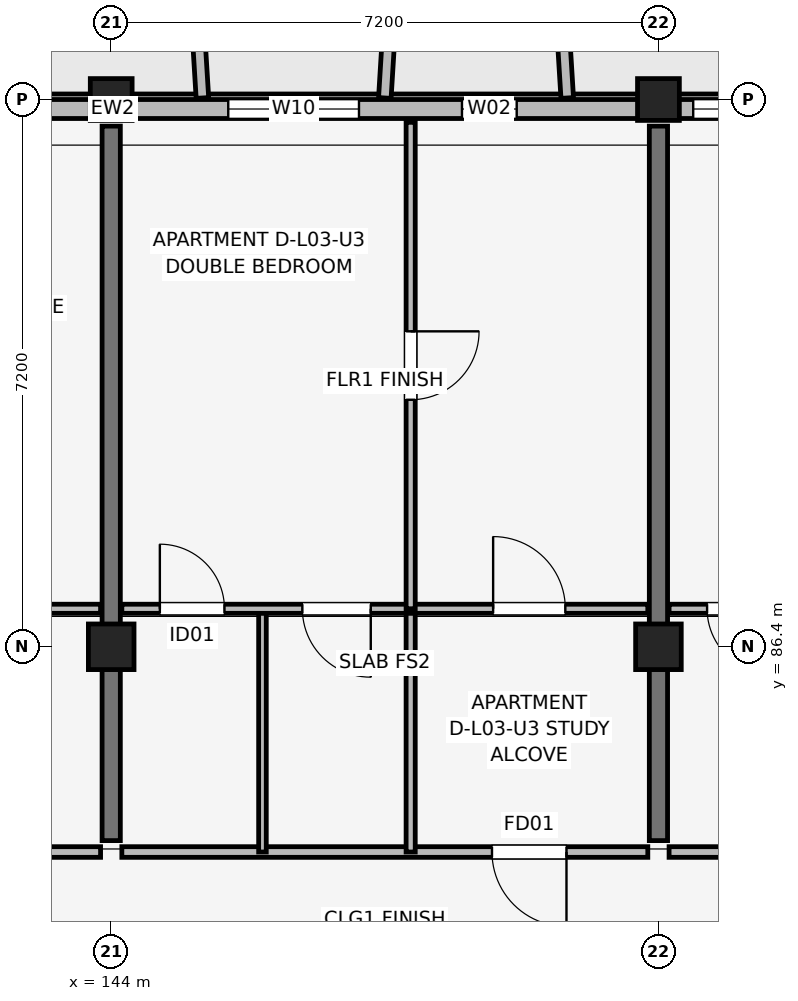
"""IFC4 building model, lengths in metres.
Left out: names, types, materials, properties, quantities, classifications, styles, units other than length and angle.
Written with IfcOpenShell. Run it as: python <this file> out.ifc"""

import sys

from ifc_helpers import new_model, si_unit, direction, frame, frame_2d, origin, origin_2d, place, context, subcontext, project, spatial, rectangle, extrude, element, fill, save


model = new_model("IFC4")
c1 = context("Model", 3, precision=1e-05, world=origin(), true_north=direction((0.0, 1.0)))
c2 = subcontext(c1, "Body", "Model", "MODEL_VIEW")
j1 = project(units=[si_unit("LENGTHUNIT", "METRE"), si_unit("PLANEANGLEUNIT", "RADIAN")], contexts=[c1])
p1 = place(None, origin())
s1 = spatial("IfcSite", under=j1, at=p1, CompositionType="ELEMENT")
p2 = place(p1, origin())
s2 = spatial("IfcBuilding", under=s1, at=p2, CompositionType="ELEMENT")
p3 = place(p2, frame((0.0, 0.0, 11.85)))
s3 = spatial("IfcBuildingStorey", under=s2, at=p3, CompositionType="ELEMENT", Elevation=11.85)
p4 = place(p3, frame((144.0, 86.4, 0.0), z_axis=(0.0, 0.0, 1.0), x_axis=(1.0, 0.0, 0.0)))
e1 = element("IfcColumn", 1, at=p4, inside=s3, PredefinedType="COLUMN", context=c2, shape_type="SweptSolid", body=[
    extrude(rectangle(XDim=0.6, YDim=0.6, at=origin_2d()), origin(), (0.0, 0.0, 1.0), 3.15),
])
p5 = place(p3, frame((144.0, 93.6, 0.0), z_axis=(0.0, 0.0, 1.0), x_axis=(1.0, 0.0, 0.0)))
e2 = element("IfcColumn", 2, at=p5, inside=s3, PredefinedType="COLUMN", context=c2, shape_type="SweptSolid", body=[
    extrude(rectangle(XDim=0.55, YDim=0.55, at=origin_2d()), origin(), (0.0, 0.0, 1.0), 3.15),
])
p6 = place(p3, frame((151.2, 86.4, 0.0), z_axis=(0.0, 0.0, 1.0), x_axis=(1.0, 0.0, 0.0)))
e3 = element("IfcColumn", 3, at=p6, inside=s3, PredefinedType="COLUMN", context=c2, shape_type="SweptSolid", body=[
    extrude(rectangle(XDim=0.6, YDim=0.6, at=origin_2d()), origin(), (0.0, 0.0, 1.0), 3.15),
])
p7 = place(p3, frame((151.2, 93.6, 0.0), z_axis=(0.0, 0.0, 1.0), x_axis=(1.0, 0.0, 0.0)))
e4 = element("IfcColumn", 4, at=p7, inside=s3, PredefinedType="COLUMN", context=c2, shape_type="SweptSolid", body=[
    extrude(rectangle(XDim=0.55, YDim=0.55, at=origin_2d()), origin(), (0.0, 0.0, 1.0), 3.15),
])
for number, where, z_axis, x_axis in (
    (5, (144.0, 83.85, 0.0), (0.0, 0.0, 1.0), (0.0, 1.0, 0.0)),
    (6, (151.2, 83.85, 0.0), (0.0, 0.0, 1.0), (0.0, 1.0, 0.0)),
):
    element("IfcWall", number, at=place(p3, frame(where, z_axis=z_axis, x_axis=x_axis)), inside=s3, PredefinedType="SHEAR", context=c2, shape_type="SweptSolid", body=[
        extrude(rectangle(XDim=9.4, YDim=0.24, at=frame_2d((4.7, 0.0))), origin(), (0.0, 0.0, 1.0), 3.15),
    ])
p8 = place(p3, frame((162.8, 93.475, 0.0), z_axis=(0.0, 0.0, 1.0), x_axis=(-1.0, 0.0, 0.0)))
e7 = element("IfcWall", 7, at=p8, inside=s3, PredefinedType="SOLIDWALL", context=c2, shape_type="SweptSolid", body=[
    extrude(rectangle(XDim=30.4, YDim=0.25, at=frame_2d((15.2, 0.0))), origin(), (0.0, 0.0, 1.0), 2.43),
])
p9 = place(p8, frame((22.1, 0.0, 0.0), z_axis=(0.0, 0.0, 1.0), x_axis=(-1.0, 0.0, 0.0)))
e8 = element("IfcOpeningElement", 8, at=p9, cuts=e7, PredefinedType="OPENING", context=c2, shape_type="SweptSolid", body=[
    extrude(rectangle(XDim=1.8, YDim=2.15, at=frame_2d((0.9, 1.075))), frame((0.0, 0.135, 0.0), z_axis=(0.0, -1.0, 0.0), x_axis=(1.0, 0.0, 0.0)), (0.0, 0.0, 1.0), 0.27),
])
p10 = place(p8, frame((7.625, 0.0, 0.0), z_axis=(0.0, 0.0, 1.0), x_axis=(-1.0, 0.0, 0.0)))
e9 = element("IfcOpeningElement", 9, at=p10, cuts=e7, PredefinedType="OPENING", context=c2, shape_type="SweptSolid", body=[
    extrude(rectangle(XDim=1.65, YDim=2.15, at=frame_2d((0.825, 1.075))), frame((0.0, 0.135, 0.0), z_axis=(0.0, -1.0, 0.0), x_axis=(1.0, 0.0, 0.0)), (0.0, 0.0, 1.0), 0.27),
])
p11 = place(p8, frame((27.97, 0.0, 0.7)))
e10 = element("IfcOpeningElement", 10, at=p11, cuts=e7, PredefinedType="OPENING", context=c2, shape_type="SweptSolid", body=[
    extrude(rectangle(XDim=1.46, YDim=1.55, at=frame_2d((0.73, 0.775))), frame((0.0, 0.135, 0.0), z_axis=(0.0, -1.0, 0.0), x_axis=(1.0, 0.0, 0.0)), (0.0, 0.0, 1.0), 0.27),
])
p12 = place(p8, frame((26.458, 0.0, 0.75)))
e11 = element("IfcOpeningElement", 11, at=p12, cuts=e7, PredefinedType="OPENING", context=c2, shape_type="SweptSolid", body=[
    extrude(rectangle(XDim=0.6, YDim=1.25, at=frame_2d((0.3, 0.625))), frame((0.0, 0.135, 0.0), z_axis=(0.0, -1.0, 0.0), x_axis=(1.0, 0.0, 0.0)), (0.0, 0.0, 1.0), 0.27),
])
p13 = place(p8, frame((24.942, 0.0, 0.75)))
e12 = element("IfcOpeningElement", 12, at=p13, cuts=e7, PredefinedType="OPENING", context=c2, shape_type="SweptSolid", body=[
    extrude(rectangle(XDim=0.6, YDim=1.25, at=frame_2d((0.3, 0.625))), frame((0.0, 0.135, 0.0), z_axis=(0.0, -1.0, 0.0), x_axis=(1.0, 0.0, 0.0)), (0.0, 0.0, 1.0), 0.27),
])
p14 = place(p8, frame((15.54, 0.0, 0.7)))
e13 = element("IfcOpeningElement", 13, at=p14, cuts=e7, PredefinedType="OPENING", context=c2, shape_type="SweptSolid", body=[
    extrude(rectangle(XDim=1.72, YDim=1.6, at=frame_2d((0.86, 0.8))), frame((0.0, 0.135, 0.0), z_axis=(0.0, -1.0, 0.0), x_axis=(1.0, 0.0, 0.0)), (0.0, 0.0, 1.0), 0.27),
])
p15 = place(p8, frame((13.465, 0.0, 0.75)))
e14 = element("IfcOpeningElement", 14, at=p15, cuts=e7, PredefinedType="OPENING", context=c2, shape_type="SweptSolid", body=[
    extrude(rectangle(XDim=0.72, YDim=1.35, at=frame_2d((0.36, 0.675))), frame((0.0, 0.135, 0.0), z_axis=(0.0, -1.0, 0.0), x_axis=(1.0, 0.0, 0.0)), (0.0, 0.0, 1.0), 0.27),
])
p16 = place(p8, frame((10.542, 0.0, 0.75)))
e15 = element("IfcOpeningElement", 15, at=p16, cuts=e7, PredefinedType="OPENING", context=c2, shape_type="SweptSolid", body=[
    extrude(rectangle(XDim=0.6, YDim=1.25, at=frame_2d((0.3, 0.625))), frame((0.0, 0.135, 0.0), z_axis=(0.0, -1.0, 0.0), x_axis=(1.0, 0.0, 0.0)), (0.0, 0.0, 1.0), 0.27),
])
p17 = place(p8, frame((3.343, 0.0, 0.75)))
e16 = element("IfcOpeningElement", 16, at=p17, cuts=e7, PredefinedType="OPENING", context=c2, shape_type="SweptSolid", body=[
    extrude(rectangle(XDim=0.6, YDim=1.25, at=frame_2d((0.3, 0.625))), frame((0.0, 0.135, 0.0), z_axis=(0.0, -1.0, 0.0), x_axis=(1.0, 0.0, 0.0)), (0.0, 0.0, 1.0), 0.27),
])
p18 = place(p8, frame((1.02, 0.0, 0.75)))
e17 = element("IfcOpeningElement", 17, at=p18, cuts=e7, PredefinedType="OPENING", context=c2, shape_type="SweptSolid", body=[
    extrude(rectangle(XDim=1.1, YDim=1.5, at=frame_2d((0.55, 0.75))), frame((0.0, 0.135, 0.0), z_axis=(0.0, -1.0, 0.0), x_axis=(1.0, 0.0, 0.0)), (0.0, 0.0, 1.0), 0.27),
])
for number, where, z_axis, x_axis in (
    (18, (145.2, 93.62, 0.0), (0.0, 0.0, 1.0), (-0.061, 0.998, 0.0)),
    (19, (147.6, 93.62, 0.0), (0.0, 0.0, 1.0), (0.061, 0.998, 0.0)),
    (20, (150.0, 93.62, 0.0), (0.0, 0.0, 1.0), (-0.061, 0.998, 0.0)),
):
    element("IfcWall", number, at=place(p3, frame(where, z_axis=z_axis, x_axis=x_axis)), inside=s3, PredefinedType="ELEMENTEDWALL", context=c2, shape_type="SweptSolid", body=[
        extrude(rectangle(XDim=1.964, YDim=0.165, at=frame_2d((0.982, 0.0))), origin(), (0.0, 0.0, 1.0), 2.55),
    ])
p19 = place(p3, frame((136.94, 83.7, 0.0), z_axis=(0.0, 0.0, 1.0), x_axis=(1.0, 0.0, 0.0)))
e21 = element("IfcWall", 21, at=p19, inside=s3, PredefinedType="PARTITIONING", context=c2, shape_type="SweptSolid", body=[
    extrude(rectangle(XDim=6.92, YDim=0.14, at=frame_2d((3.46, 0.0))), origin(), (0.0, 0.0, 1.0), 2.38),
])
p20 = place(p19, frame((5.02, 0.0, 0.0)))
e22 = element("IfcOpeningElement", 22, at=p20, cuts=e21, PredefinedType="OPENING", context=c2, shape_type="SweptSolid", body=[
    extrude(rectangle(XDim=0.98, YDim=2.1, at=frame_2d((0.49, 1.05))), frame((0.0, 0.08, 0.0), z_axis=(0.0, -1.0, 0.0), x_axis=(1.0, 0.0, 0.0)), (0.0, 0.0, 1.0), 0.16),
])
p21 = place(p3, frame((136.94, 86.9, 0.0), z_axis=(0.0, 0.0, 1.0), x_axis=(1.0, 0.0, 0.0)))
e23 = element("IfcWall", 23, at=p21, inside=s3, PredefinedType="PARTITIONING", context=c2, shape_type="SweptSolid", body=[
    extrude(rectangle(XDim=6.92, YDim=0.12, at=frame_2d((3.46, 0.0))), origin(), (0.0, 0.0, 1.0), 2.38),
])
p22 = place(p21, frame((1.35, 0.0, 0.0), z_axis=(0.0, 0.0, 1.0), x_axis=(-1.0, 0.0, 0.0)))
e24 = element("IfcOpeningElement", 24, at=p22, cuts=e23, PredefinedType="OPENING", context=c2, shape_type="SweptSolid", body=[
    extrude(rectangle(XDim=0.85, YDim=2.08, at=frame_2d((0.425, 1.04))), frame((0.0, 0.07, 0.0), z_axis=(0.0, -1.0, 0.0), x_axis=(1.0, 0.0, 0.0)), (0.0, 0.0, 1.0), 0.14),
])
p23 = place(p21, frame((2.525, 0.0, 0.0)))
e25 = element("IfcOpeningElement", 25, at=p23, cuts=e23, PredefinedType="OPENING", context=c2, shape_type="SweptSolid", body=[
    extrude(rectangle(XDim=0.9, YDim=2.08, at=frame_2d((0.45, 1.04))), frame((0.0, 0.07, 0.0), z_axis=(0.0, -1.0, 0.0), x_axis=(1.0, 0.0, 0.0)), (0.0, 0.0, 1.0), 0.14),
])
p24 = place(p21, frame((5.985, 0.0, 0.0), z_axis=(0.0, 0.0, 1.0), x_axis=(-1.0, 0.0, 0.0)))
e26 = element("IfcOpeningElement", 26, at=p24, cuts=e23, PredefinedType="OPENING", context=c2, shape_type="SweptSolid", body=[
    extrude(rectangle(XDim=0.95, YDim=2.08, at=frame_2d((0.475, 1.04))), frame((0.0, 0.07, 0.0), z_axis=(0.0, -1.0, 0.0), x_axis=(1.0, 0.0, 0.0)), (0.0, 0.0, 1.0), 0.14),
])
p25 = place(p3, frame((144.14, 83.7, 0.0), z_axis=(0.0, 0.0, 1.0), x_axis=(1.0, 0.0, 0.0)))
e27 = element("IfcWall", 27, at=p25, inside=s3, PredefinedType="PARTITIONING", context=c2, shape_type="SweptSolid", body=[
    extrude(rectangle(XDim=6.92, YDim=0.14, at=frame_2d((3.46, 0.0))), origin(), (0.0, 0.0, 1.0), 2.38),
])
p26 = place(p25, frame((5.85, 0.0, 0.0), z_axis=(0.0, 0.0, 1.0), x_axis=(-1.0, 0.0, 0.0)))
e28 = element("IfcOpeningElement", 28, at=p26, cuts=e27, PredefinedType="OPENING", context=c2, shape_type="SweptSolid", body=[
    extrude(rectangle(XDim=0.98, YDim=2.1, at=frame_2d((0.49, 1.05))), frame((0.0, 0.08, 0.0), z_axis=(0.0, -1.0, 0.0), x_axis=(1.0, 0.0, 0.0)), (0.0, 0.0, 1.0), 0.16),
])
p27 = place(p3, frame((145.99, 83.7, 0.0), z_axis=(0.0, 0.0, 1.0), x_axis=(0.0, 1.0, 0.0)))
e29 = element("IfcWall", 29, at=p27, inside=s3, PredefinedType="PARTITIONING", context=c2, shape_type="SweptSolid", body=[
    extrude(rectangle(XDim=3.2, YDim=0.1, at=frame_2d((1.6, 0.0))), origin(), (0.0, 0.0, 1.0), 2.375),
])
p28 = place(p3, frame((147.94, 83.7, 0.0), z_axis=(0.0, 0.0, 1.0), x_axis=(0.0, 1.0, 0.0)))
e30 = element("IfcWall", 30, at=p28, inside=s3, PredefinedType="PARTITIONING", context=c2, shape_type="SweptSolid", body=[
    extrude(rectangle(XDim=3.2, YDim=0.12, at=frame_2d((1.6, 0.0))), origin(), (0.0, 0.0, 1.0), 2.375),
])
p29 = place(p3, frame((144.14, 86.9, 0.0), z_axis=(0.0, 0.0, 1.0), x_axis=(1.0, 0.0, 0.0)))
e31 = element("IfcWall", 31, at=p29, inside=s3, PredefinedType="PARTITIONING", context=c2, shape_type="SweptSolid", body=[
    extrude(rectangle(XDim=6.92, YDim=0.12, at=frame_2d((3.46, 0.0))), origin(), (0.0, 0.0, 1.0), 2.38),
])
p30 = place(p29, frame((0.5, 0.0, 0.0)))
e32 = element("IfcOpeningElement", 32, at=p30, cuts=e31, PredefinedType="OPENING", context=c2, shape_type="SweptSolid", body=[
    extrude(rectangle(XDim=0.85, YDim=2.08, at=frame_2d((0.425, 1.04))), frame((0.0, 0.07, 0.0), z_axis=(0.0, -1.0, 0.0), x_axis=(1.0, 0.0, 0.0)), (0.0, 0.0, 1.0), 0.14),
])
p31 = place(p29, frame((3.275, 0.0, 0.0), z_axis=(0.0, 0.0, 1.0), x_axis=(-1.0, 0.0, 0.0)))
e33 = element("IfcOpeningElement", 33, at=p31, cuts=e31, PredefinedType="OPENING", context=c2, shape_type="SweptSolid", body=[
    extrude(rectangle(XDim=0.9, YDim=2.08, at=frame_2d((0.45, 1.04))), frame((0.0, 0.07, 0.0), z_axis=(0.0, -1.0, 0.0), x_axis=(1.0, 0.0, 0.0)), (0.0, 0.0, 1.0), 0.14),
])
p32 = place(p29, frame((4.885, 0.0, 0.0)))
e34 = element("IfcOpeningElement", 34, at=p32, cuts=e31, PredefinedType="OPENING", context=c2, shape_type="SweptSolid", body=[
    extrude(rectangle(XDim=0.95, YDim=2.08, at=frame_2d((0.475, 1.04))), frame((0.0, 0.07, 0.0), z_axis=(0.0, -1.0, 0.0), x_axis=(1.0, 0.0, 0.0)), (0.0, 0.0, 1.0), 0.14),
])
p33 = place(p3, frame((147.94, 86.9, 0.0), z_axis=(0.0, 0.0, 1.0), x_axis=(0.0, 1.0, 0.0)))
e35 = element("IfcWall", 35, at=p33, inside=s3, PredefinedType="PARTITIONING", context=c2, shape_type="SweptSolid", body=[
    extrude(rectangle(XDim=6.4, YDim=0.12, at=frame_2d((3.2, 0.0))), origin(), (0.0, 0.0, 1.0), 2.38),
])
p34 = place(p33, frame((3.65, 0.0, 0.0), z_axis=(0.0, 0.0, 1.0), x_axis=(-1.0, 0.0, 0.0)))
e36 = element("IfcOpeningElement", 36, at=p34, cuts=e35, PredefinedType="OPENING", context=c2, shape_type="SweptSolid", body=[
    extrude(rectangle(XDim=0.9, YDim=2.08, at=frame_2d((0.45, 1.04))), frame((0.0, 0.07, 0.0), z_axis=(0.0, -1.0, 0.0), x_axis=(1.0, 0.0, 0.0)), (0.0, 0.0, 1.0), 0.14),
])
p35 = place(p3, frame((151.34, 83.7, 0.0), z_axis=(0.0, 0.0, 1.0), x_axis=(1.0, 0.0, 0.0)))
e37 = element("IfcWall", 37, at=p35, inside=s3, PredefinedType="PARTITIONING", context=c2, shape_type="SweptSolid", body=[
    extrude(rectangle(XDim=6.92, YDim=0.14, at=frame_2d((3.46, 0.0))), origin(), (0.0, 0.0, 1.0), 2.38),
])
p36 = place(p35, frame((5.02, 0.0, 0.0)))
e38 = element("IfcOpeningElement", 38, at=p36, cuts=e37, PredefinedType="OPENING", context=c2, shape_type="SweptSolid", body=[
    extrude(rectangle(XDim=0.98, YDim=2.1, at=frame_2d((0.49, 1.05))), frame((0.0, 0.08, 0.0), z_axis=(0.0, -1.0, 0.0), x_axis=(1.0, 0.0, 0.0)), (0.0, 0.0, 1.0), 0.16),
])
p37 = place(p3, frame((151.34, 86.9, 0.0), z_axis=(0.0, 0.0, 1.0), x_axis=(1.0, 0.0, 0.0)))
e39 = element("IfcWall", 39, at=p37, inside=s3, PredefinedType="PARTITIONING", context=c2, shape_type="SweptSolid", body=[
    extrude(rectangle(XDim=6.92, YDim=0.12, at=frame_2d((3.46, 0.0))), origin(), (0.0, 0.0, 1.0), 2.38),
])
p38 = place(p37, frame((1.35, 0.0, 0.0), z_axis=(0.0, 0.0, 1.0), x_axis=(-1.0, 0.0, 0.0)))
e40 = element("IfcOpeningElement", 40, at=p38, cuts=e39, PredefinedType="OPENING", context=c2, shape_type="SweptSolid", body=[
    extrude(rectangle(XDim=0.85, YDim=2.08, at=frame_2d((0.425, 1.04))), frame((0.0, 0.07, 0.0), z_axis=(0.0, -1.0, 0.0), x_axis=(1.0, 0.0, 0.0)), (0.0, 0.0, 1.0), 0.14),
])
p39 = place(p37, frame((2.525, 0.0, 0.0)))
e41 = element("IfcOpeningElement", 41, at=p39, cuts=e39, PredefinedType="OPENING", context=c2, shape_type="SweptSolid", body=[
    extrude(rectangle(XDim=0.9, YDim=2.08, at=frame_2d((0.45, 1.04))), frame((0.0, 0.07, 0.0), z_axis=(0.0, -1.0, 0.0), x_axis=(1.0, 0.0, 0.0)), (0.0, 0.0, 1.0), 0.14),
])
p40 = place(p37, frame((5.985, 0.0, 0.0), z_axis=(0.0, 0.0, 1.0), x_axis=(-1.0, 0.0, 0.0)))
e42 = element("IfcOpeningElement", 42, at=p40, cuts=e39, PredefinedType="OPENING", context=c2, shape_type="SweptSolid", body=[
    extrude(rectangle(XDim=0.95, YDim=2.08, at=frame_2d((0.475, 1.04))), frame((0.0, 0.07, 0.0), z_axis=(0.0, -1.0, 0.0), x_axis=(1.0, 0.0, 0.0)), (0.0, 0.0, 1.0), 0.14),
])
p41 = place(p14, origin())
e43 = element("IfcWindow", 43, at=p41, inside=s3, PartitioningType="SINGLE_PANEL", PredefinedType="WINDOW", context=c2, shape_type="SweptSolid", body=[
    extrude(rectangle(XDim=1.72, YDim=1.6, at=frame_2d((0.86, 0.8))), frame((0.0, 0.03, 0.0), z_axis=(0.0, -1.0, 0.0), x_axis=(1.0, 0.0, 0.0)), (0.0, 0.0, 1.0), 0.06),
])
fill(e13, e43)
p42 = place(p15, origin())
e44 = element("IfcWindow", 44, at=p42, inside=s3, PartitioningType="SINGLE_PANEL", PredefinedType="WINDOW", context=c2, shape_type="SweptSolid", body=[
    extrude(rectangle(XDim=0.72, YDim=1.35, at=frame_2d((0.36, 0.675))), frame((0.0, 0.03, 0.0), z_axis=(0.0, -1.0, 0.0), x_axis=(1.0, 0.0, 0.0)), (0.0, 0.0, 1.0), 0.06),
])
fill(e14, e44)
p43 = place(p16, origin())
e45 = element("IfcWindow", 45, at=p43, inside=s3, PartitioningType="SINGLE_PANEL", PredefinedType="WINDOW", context=c2, shape_type="SweptSolid", body=[
    extrude(rectangle(XDim=0.6, YDim=1.25, at=frame_2d((0.3, 0.625))), frame((0.0, 0.03, 0.0), z_axis=(0.0, -1.0, 0.0), x_axis=(1.0, 0.0, 0.0)), (0.0, 0.0, 1.0), 0.06),
])
fill(e15, e45)
p44 = place(p26, origin())
e46 = element("IfcDoor", 46, at=p44, inside=s3, OperationType="SINGLE_SWING_RIGHT", PredefinedType="DOOR", context=c2, shape_type="SweptSolid", body=[
    extrude(rectangle(XDim=0.98, YDim=2.1, at=frame_2d((0.49, 1.05))), frame((0.0, 0.025, 0.0), z_axis=(0.0, -1.0, 0.0), x_axis=(1.0, 0.0, 0.0)), (0.0, 0.0, 1.0), 0.05),
])
fill(e28, e46)
p45 = place(p30, origin())
e47 = element("IfcDoor", 47, at=p45, inside=s3, OperationType="SINGLE_SWING_LEFT", PredefinedType="DOOR", context=c2, shape_type="SweptSolid", body=[
    extrude(rectangle(XDim=0.85, YDim=2.08, at=frame_2d((0.425, 1.04))), frame((0.0, 0.025, 0.0), z_axis=(0.0, -1.0, 0.0), x_axis=(1.0, 0.0, 0.0)), (0.0, 0.0, 1.0), 0.05),
])
fill(e32, e47)
p46 = place(p31, origin())
e48 = element("IfcDoor", 48, at=p46, inside=s3, OperationType="SINGLE_SWING_RIGHT", PredefinedType="DOOR", context=c2, shape_type="SweptSolid", body=[
    extrude(rectangle(XDim=0.9, YDim=2.08, at=frame_2d((0.45, 1.04))), frame((0.0, 0.025, 0.0), z_axis=(0.0, -1.0, 0.0), x_axis=(1.0, 0.0, 0.0)), (0.0, 0.0, 1.0), 0.05),
])
fill(e33, e48)
p47 = place(p32, origin())
e49 = element("IfcDoor", 49, at=p47, inside=s3, OperationType="SINGLE_SWING_LEFT", PredefinedType="DOOR", context=c2, shape_type="SweptSolid", body=[
    extrude(rectangle(XDim=0.95, YDim=2.08, at=frame_2d((0.475, 1.04))), frame((0.0, 0.025, 0.0), z_axis=(0.0, -1.0, 0.0), x_axis=(1.0, 0.0, 0.0)), (0.0, 0.0, 1.0), 0.05),
])
fill(e34, e49)
p48 = place(p34, origin())
e50 = element("IfcDoor", 50, at=p48, inside=s3, OperationType="SINGLE_SWING_RIGHT", PredefinedType="DOOR", context=c2, shape_type="SweptSolid", body=[
    extrude(rectangle(XDim=0.9, YDim=2.08, at=frame_2d((0.45, 1.04))), frame((0.0, 0.025, 0.0), z_axis=(0.0, -1.0, 0.0), x_axis=(1.0, 0.0, 0.0)), (0.0, 0.0, 1.0), 0.05),
])
fill(e36, e50)
p49 = place(p38, origin())
e51 = element("IfcDoor", 51, at=p49, inside=s3, OperationType="SINGLE_SWING_RIGHT", PredefinedType="DOOR", context=c2, shape_type="SweptSolid", body=[
    extrude(rectangle(XDim=0.85, YDim=2.08, at=frame_2d((0.425, 1.04))), frame((0.0, 0.025, 0.0), z_axis=(0.0, -1.0, 0.0), x_axis=(1.0, 0.0, 0.0)), (0.0, 0.0, 1.0), 0.05),
])
fill(e40, e51)
save(model, sys.argv[1])
